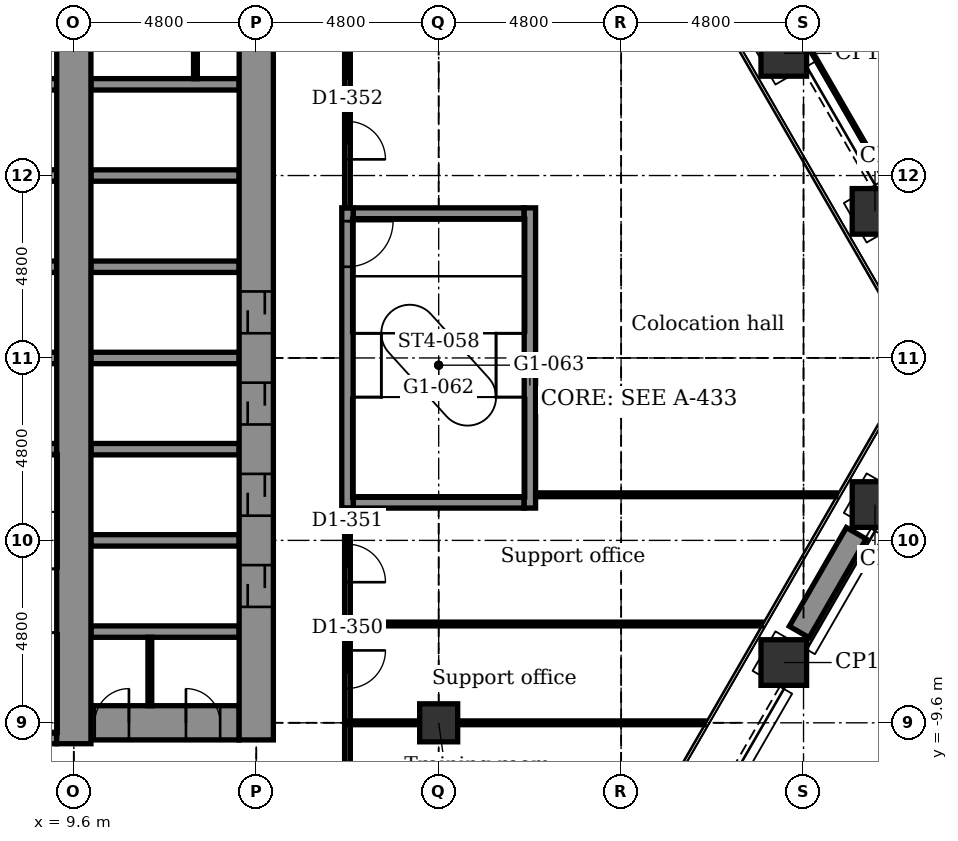
"""IFC4 building model, lengths in metres.
Left out: names, types, materials, properties, quantities, classifications, styles, units other than length and angle.
Written with IfcOpenShell. Run it as: python <this file> out.ifc"""

import sys

from ifc_helpers import new_model, si_unit, direction, frame, frame_2d, origin, origin_2d, place, context, subcontext, project, spatial, rectangle, extrude, element, fill, save


model = new_model("IFC4")
c1 = context("Model", 3, precision=1e-05, world=origin(), true_north=direction((0.0, 1.0)))
c2 = subcontext(c1, "Body", "Model", "MODEL_VIEW")
j1 = project(units=[si_unit("LENGTHUNIT", "METRE"), si_unit("PLANEANGLEUNIT", "RADIAN")], contexts=[c1])
p1 = place(None, origin())
s1 = spatial("IfcSite", under=j1, at=p1, CompositionType="ELEMENT")
p2 = place(p1, origin())
s2 = spatial("IfcBuilding", under=s1, at=p2, CompositionType="ELEMENT")
p3 = place(p2, frame((0.0, 0.0, 122.9)))
s3 = spatial("IfcBuildingStorey", under=s2, at=p3, CompositionType="ELEMENT", Elevation=122.9)
for number, where, z_axis, x_axis in (
    (1, (28.28, 8.014, -0.2), (0.0, 0.0, 1.0), (0.866, 0.5, 0.0)),
    (2, (30.68, 3.857, -0.2), (0.0, 0.0, 1.0), (0.866, 0.5, 0.0)),
    (3, (30.68, -3.857, -0.2), (0.0, 0.0, 1.0), (0.5, 0.866, 0.0)),
    (4, (28.28, -8.014, -0.2), (0.0, 0.0, 1.0), (0.5, 0.866, 0.0)),
):
    element("IfcColumn", number, at=place(p3, frame(where, z_axis=z_axis, x_axis=x_axis)), inside=s3, PredefinedType="COLUMN", context=c2, shape_type="SweptSolid", body=[
        extrude(rectangle(XDim=1.2, YDim=1.2, at=origin_2d()), origin(), (0.0, 0.0, 1.0), 4.4),
    ])
p4 = place(p3, frame((19.2, -9.6, -0.2), z_axis=(0.0, 0.0, 1.0), x_axis=(1.0, 0.0, 0.0)))
e5 = element("IfcColumn", 5, at=p4, inside=s3, PredefinedType="COLUMN", context=c2, shape_type="SweptSolid", body=[
    extrude(rectangle(XDim=1.0, YDim=1.0, at=origin_2d()), origin(), (0.0, 0.0, 1.0), 4.4),
])
p5 = place(p3, frame((4.95, -10.0, -0.2), z_axis=(0.0, 0.0, 1.0), x_axis=(1.0, 0.0, 0.0)))
e6 = element("IfcWall", 6, at=p5, inside=s3, PredefinedType="STANDARD", context=c2, shape_type="SweptSolid", body=[
    extrude(rectangle(XDim=4.2, YDim=0.3, at=frame_2d((2.1, 0.0))), origin(), (0.0, 0.0, 1.0), 4.4),
])
p6 = place(p3, frame((10.05, -9.6, -0.2), z_axis=(0.0, 0.0, 1.0), x_axis=(1.0, 0.0, 0.0)))
e7 = element("IfcWall", 7, at=p6, inside=s3, PredefinedType="SHEAR", context=c2, shape_type="SweptSolid", body=[
    extrude(rectangle(XDim=3.9, YDim=0.9, at=frame_2d((1.95, 0.0))), origin(), (0.0, 0.0, 1.0), 4.4),
])
p7 = place(p6, frame((0.1, 0.0, 0.2)))
e8 = element("IfcOpeningElement", 8, at=p7, cuts=e7, PredefinedType="OPENING", context=c2, shape_type="SweptSolid", body=[
    extrude(rectangle(XDim=0.9, YDim=2.1, at=frame_2d((0.45, 1.05))), frame((0.0, 0.46, 0.0), z_axis=(0.0, -1.0, 0.0), x_axis=(1.0, 0.0, 0.0)), (0.0, 0.0, 1.0), 0.92),
])
p8 = place(p6, frame((2.5, 0.0, 0.2)))
e9 = element("IfcOpeningElement", 9, at=p8, cuts=e7, PredefinedType="OPENING", context=c2, shape_type="SweptSolid", body=[
    extrude(rectangle(XDim=0.9, YDim=2.1, at=frame_2d((0.45, 1.05))), frame((0.0, 0.46, 0.0), z_axis=(0.0, -1.0, 0.0), x_axis=(1.0, 0.0, 0.0)), (0.0, 0.0, 1.0), 0.92),
])
for number, where, z_axis, x_axis in (
    (10, (10.05, -7.2, -0.2), (0.0, 0.0, 1.0), (1.0, 0.0, 0.0)),
    (11, (10.05, -4.8, -0.2), (0.0, 0.0, 1.0), (1.0, 0.0, 0.0)),
):
    element("IfcWall", number, at=place(p3, frame(where, z_axis=z_axis, x_axis=x_axis)), inside=s3, PredefinedType="STANDARD", context=c2, shape_type="SweptSolid", body=[
        extrude(rectangle(XDim=3.9, YDim=0.3, at=frame_2d((1.95, 0.0))), origin(), (0.0, 0.0, 1.0), 4.4),
    ])
p9 = place(p3, frame((16.95, -3.8, -0.2), z_axis=(0.0, 0.0, 1.0), x_axis=(1.0, 0.0, 0.0)))
e12 = element("IfcWall", 12, at=p9, inside=s3, PredefinedType="STANDARD", context=c2, shape_type="SweptSolid", body=[
    extrude(rectangle(XDim=4.5, YDim=0.3, at=frame_2d((2.25, 0.0))), origin(), (0.0, 0.0, 1.0), 4.4),
])
p10 = place(p3, frame((6.15, -2.4, -0.2), z_axis=(0.0, 0.0, 1.0), x_axis=(1.0, 0.0, 0.0)))
e13 = element("IfcWall", 13, at=p10, inside=s3, PredefinedType="STANDARD", context=c2, shape_type="SweptSolid", body=[
    extrude(rectangle(XDim=3.0, YDim=0.3, at=frame_2d((1.5, 0.0))), origin(), (0.0, 0.0, 1.0), 4.4),
])
p11 = place(p3, frame((10.05, -2.4, -0.2), z_axis=(0.0, 0.0, 1.0), x_axis=(1.0, 0.0, 0.0)))
e14 = element("IfcWall", 14, at=p11, inside=s3, PredefinedType="STANDARD", context=c2, shape_type="SweptSolid", body=[
    extrude(rectangle(XDim=3.9, YDim=0.3, at=frame_2d((1.95, 0.0))), origin(), (0.0, 0.0, 1.0), 4.4),
])
p12 = place(p3, frame((6.15, 0.0, -0.2), z_axis=(0.0, 0.0, 1.0), x_axis=(1.0, 0.0, 0.0)))
e15 = element("IfcWall", 15, at=p12, inside=s3, PredefinedType="STANDARD", context=c2, shape_type="SweptSolid", body=[
    extrude(rectangle(XDim=3.0, YDim=0.3, at=frame_2d((1.5, 0.0))), origin(), (0.0, 0.0, 1.0), 4.4),
])
p13 = place(p3, frame((10.05, 0.0, -0.2), z_axis=(0.0, 0.0, 1.0), x_axis=(1.0, 0.0, 0.0)))
e16 = element("IfcWall", 16, at=p13, inside=s3, PredefinedType="STANDARD", context=c2, shape_type="SweptSolid", body=[
    extrude(rectangle(XDim=3.9, YDim=0.3, at=frame_2d((1.95, 0.0))), origin(), (0.0, 0.0, 1.0), 4.4),
])
p14 = place(p3, frame((6.15, 2.4, -0.2), z_axis=(0.0, 0.0, 1.0), x_axis=(1.0, 0.0, 0.0)))
e17 = element("IfcWall", 17, at=p14, inside=s3, PredefinedType="STANDARD", context=c2, shape_type="SweptSolid", body=[
    extrude(rectangle(XDim=3.0, YDim=0.3, at=frame_2d((1.5, 0.0))), origin(), (0.0, 0.0, 1.0), 4.4),
])
p15 = place(p3, frame((10.05, 2.4, -0.2), z_axis=(0.0, 0.0, 1.0), x_axis=(1.0, 0.0, 0.0)))
e18 = element("IfcWall", 18, at=p15, inside=s3, PredefinedType="STANDARD", context=c2, shape_type="SweptSolid", body=[
    extrude(rectangle(XDim=3.9, YDim=0.3, at=frame_2d((1.95, 0.0))), origin(), (0.0, 0.0, 1.0), 4.4),
])
p16 = place(p3, frame((16.95, 3.8, -0.2), z_axis=(0.0, 0.0, 1.0), x_axis=(1.0, 0.0, 0.0)))
e19 = element("IfcWall", 19, at=p16, inside=s3, PredefinedType="STANDARD", context=c2, shape_type="SweptSolid", body=[
    extrude(rectangle(XDim=4.5, YDim=0.3, at=frame_2d((2.25, 0.0))), origin(), (0.0, 0.0, 1.0), 4.4),
])
p17 = place(p3, frame((6.15, 4.8, -0.2), z_axis=(0.0, 0.0, 1.0), x_axis=(1.0, 0.0, 0.0)))
e20 = element("IfcWall", 20, at=p17, inside=s3, PredefinedType="STANDARD", context=c2, shape_type="SweptSolid", body=[
    extrude(rectangle(XDim=3.0, YDim=0.3, at=frame_2d((1.5, 0.0))), origin(), (0.0, 0.0, 1.0), 4.4),
])
p18 = place(p3, frame((10.05, 4.8, -0.2), z_axis=(0.0, 0.0, 1.0), x_axis=(1.0, 0.0, 0.0)))
e21 = element("IfcWall", 21, at=p18, inside=s3, PredefinedType="STANDARD", context=c2, shape_type="SweptSolid", body=[
    extrude(rectangle(XDim=3.9, YDim=0.3, at=frame_2d((1.95, 0.0))), origin(), (0.0, 0.0, 1.0), 4.4),
])
p19 = place(p3, frame((6.0, 7.2, -0.2), z_axis=(0.0, 0.0, 1.0), x_axis=(1.0, 0.0, 0.0)))
e22 = element("IfcWall", 22, at=p19, inside=s3, PredefinedType="STANDARD", context=c2, shape_type="SweptSolid", body=[
    extrude(rectangle(XDim=3.15, YDim=0.3, at=frame_2d((1.575, 0.0))), origin(), (0.0, 0.0, 1.0), 4.4),
])
p20 = place(p3, frame((10.05, 7.2, -0.2), z_axis=(0.0, 0.0, 1.0), x_axis=(1.0, 0.0, 0.0)))
e23 = element("IfcWall", 23, at=p20, inside=s3, PredefinedType="STANDARD", context=c2, shape_type="SweptSolid", body=[
    extrude(rectangle(XDim=3.9, YDim=0.3, at=frame_2d((1.95, 0.0))), origin(), (0.0, 0.0, 1.0), 4.4),
])
p21 = place(p3, frame((9.6, -10.15, -0.2), z_axis=(0.0, 0.0, 1.0), x_axis=(0.0, 1.0, 0.0)))
e24 = element("IfcWall", 24, at=p21, inside=s3, PredefinedType="SHEAR", context=c2, shape_type="SweptSolid", body=[
    extrude(rectangle(XDim=20.2, YDim=0.9, at=frame_2d((10.1, 0.0))), origin(), (0.0, 0.0, 1.0), 4.4),
])
p22 = place(p3, frame((14.4, -10.05, -0.2), z_axis=(0.0, 0.0, 1.0), x_axis=(0.0, 1.0, 0.0)))
e25 = element("IfcWall", 25, at=p22, inside=s3, PredefinedType="SHEAR", context=c2, shape_type="SweptSolid", body=[
    extrude(rectangle(XDim=20.1, YDim=0.9, at=frame_2d((10.05, 0.0))), origin(), (0.0, 0.0, 1.0), 4.4),
])
p23 = place(p22, frame((3.5, 0.0, 0.2)))
e26 = element("IfcOpeningElement", 26, at=p23, cuts=e25, PredefinedType="OPENING", context=c2, shape_type="SweptSolid", body=[
    extrude(rectangle(XDim=1.1, YDim=2.1, at=frame_2d((0.55, 1.05))), frame((0.0, 0.46, 0.0), z_axis=(0.0, -1.0, 0.0), x_axis=(1.0, 0.0, 0.0)), (0.0, 0.0, 1.0), 0.92),
])
p24 = place(p22, frame((5.9, 0.0, 0.2)))
e27 = element("IfcOpeningElement", 27, at=p24, cuts=e25, PredefinedType="OPENING", context=c2, shape_type="SweptSolid", body=[
    extrude(rectangle(XDim=1.1, YDim=2.1, at=frame_2d((0.55, 1.05))), frame((0.0, 0.46, 0.0), z_axis=(0.0, -1.0, 0.0), x_axis=(1.0, 0.0, 0.0)), (0.0, 0.0, 1.0), 0.92),
])
p25 = place(p22, frame((8.3, 0.0, 0.2)))
e28 = element("IfcOpeningElement", 28, at=p25, cuts=e25, PredefinedType="OPENING", context=c2, shape_type="SweptSolid", body=[
    extrude(rectangle(XDim=1.1, YDim=2.1, at=frame_2d((0.55, 1.05))), frame((0.0, 0.46, 0.0), z_axis=(0.0, -1.0, 0.0), x_axis=(1.0, 0.0, 0.0)), (0.0, 0.0, 1.0), 0.92),
])
p26 = place(p22, frame((10.7, 0.0, 0.2)))
e29 = element("IfcOpeningElement", 29, at=p26, cuts=e25, PredefinedType="OPENING", context=c2, shape_type="SweptSolid", body=[
    extrude(rectangle(XDim=1.1, YDim=2.1, at=frame_2d((0.55, 1.05))), frame((0.0, 0.46, 0.0), z_axis=(0.0, -1.0, 0.0), x_axis=(1.0, 0.0, 0.0)), (0.0, 0.0, 1.0), 0.92),
])
p27 = place(p3, frame((16.8, -3.95, -0.2), z_axis=(0.0, 0.0, 1.0), x_axis=(0.0, 1.0, 0.0)))
e30 = element("IfcWall", 30, at=p27, inside=s3, PredefinedType="STANDARD", context=c2, shape_type="SweptSolid", body=[
    extrude(rectangle(XDim=7.9, YDim=0.3, at=frame_2d((3.95, 0.0))), origin(), (0.0, 0.0, 1.0), 4.4),
])
p28 = place(p27, frame((6.35, 0.0, 0.2)))
e31 = element("IfcOpeningElement", 31, at=p28, cuts=e30, PredefinedType="OPENING", context=c2, shape_type="SweptSolid", body=[
    extrude(rectangle(XDim=1.2, YDim=2.1, at=frame_2d((0.6, 1.05))), frame((0.0, 0.16, 0.0), z_axis=(0.0, -1.0, 0.0), x_axis=(1.0, 0.0, 0.0)), (0.0, 0.0, 1.0), 0.32),
])
p29 = place(p3, frame((21.6, -3.95, -0.2), z_axis=(0.0, 0.0, 1.0), x_axis=(0.0, 1.0, 0.0)))
e32 = element("IfcWall", 32, at=p29, inside=s3, PredefinedType="STANDARD", context=c2, shape_type="SweptSolid", body=[
    extrude(rectangle(XDim=7.9, YDim=0.3, at=frame_2d((3.95, 0.0))), origin(), (0.0, 0.0, 1.0), 4.4),
])
p30 = place(p3, frame((30.187, -4.611, 0.0), z_axis=(0.0, 0.0, 1.0), x_axis=(-0.499990139034, -0.866031096941, 0.0)))
e33 = element("IfcWall", 33, at=p30, inside=s3, PredefinedType="USERDEFINED", context=c2, shape_type="SweptSolid", body=[
    extrude(rectangle(XDim=3.0, YDim=0.6, at=frame_2d((1.5, 0.0))), origin(), (0.0, 0.0, 1.0), 0.7),
])
p31 = place(p3, frame((16.8, -13.3, 0.0), z_axis=(0.0, 0.0, 1.0), x_axis=(0.0, 1.0, 0.0)))
e34 = element("IfcWall", 34, at=p31, inside=s3, PredefinedType="PARTITIONING", context=c2, shape_type="SweptSolid", body=[
    extrude(rectangle(XDim=9.35, YDim=0.15, at=frame_2d((4.675, 0.0))), origin(), (0.0, 0.0, 1.0), 4.2),
])
p32 = place(p31, frame((1.64, 0.0, 0.0)))
e35 = element("IfcOpeningElement", 35, at=p32, cuts=e34, PredefinedType="OPENING", context=c2, shape_type="SweptSolid", body=[
    extrude(rectangle(XDim=1.0, YDim=2.1, at=frame_2d((0.5, 1.05))), frame((0.0, 0.085, 0.0), z_axis=(0.0, -1.0, 0.0), x_axis=(1.0, 0.0, 0.0)), (0.0, 0.0, 1.0), 0.17),
])
p33 = place(p31, frame((4.605, 0.0, 0.0)))
e36 = element("IfcOpeningElement", 36, at=p33, cuts=e34, PredefinedType="OPENING", context=c2, shape_type="SweptSolid", body=[
    extrude(rectangle(XDim=1.0, YDim=2.1, at=frame_2d((0.5, 1.05))), frame((0.0, 0.085, 0.0), z_axis=(0.0, -1.0, 0.0), x_axis=(1.0, 0.0, 0.0)), (0.0, 0.0, 1.0), 0.17),
])
p34 = place(p31, frame((7.4, 0.0, 0.0)))
e37 = element("IfcOpeningElement", 37, at=p34, cuts=e34, PredefinedType="OPENING", context=c2, shape_type="SweptSolid", body=[
    extrude(rectangle(XDim=1.0, YDim=2.1, at=frame_2d((0.5, 1.05))), frame((0.0, 0.085, 0.0), z_axis=(0.0, -1.0, 0.0), x_axis=(1.0, 0.0, 0.0)), (0.0, 0.0, 1.0), 0.17),
])
p35 = place(p3, frame((16.8, 3.95, 0.0), z_axis=(0.0, 0.0, 1.0), x_axis=(0.0, 1.0, 0.0)))
e38 = element("IfcWall", 38, at=p35, inside=s3, PredefinedType="PARTITIONING", context=c2, shape_type="SweptSolid", body=[
    extrude(rectangle(XDim=9.35, YDim=0.15, at=frame_2d((4.675, 0.0))), origin(), (0.0, 0.0, 1.0), 4.2),
])
p36 = place(p35, frame((1.275, 0.0, 0.0)))
e39 = element("IfcOpeningElement", 39, at=p36, cuts=e38, PredefinedType="OPENING", context=c2, shape_type="SweptSolid", body=[
    extrude(rectangle(XDim=1.0, YDim=2.1, at=frame_2d((0.5, 1.05))), frame((0.0, 0.085, 0.0), z_axis=(0.0, -1.0, 0.0), x_axis=(1.0, 0.0, 0.0)), (0.0, 0.0, 1.0), 0.17),
])
p37 = place(p35, frame((7.76, 0.0, 0.0)))
e40 = element("IfcOpeningElement", 40, at=p37, cuts=e38, PredefinedType="OPENING", context=c2, shape_type="SweptSolid", body=[
    extrude(rectangle(XDim=1.0, YDim=2.1, at=frame_2d((0.5, 1.05))), frame((0.0, 0.085, 0.0), z_axis=(0.0, -1.0, 0.0), x_axis=(1.0, 0.0, 0.0)), (0.0, 0.0, 1.0), 0.17),
])
p38 = place(p35, frame((3.4, 0.0, 0.9)))
e41 = element("IfcOpeningElement", 41, at=p38, cuts=e38, PredefinedType="OPENING", context=c2, shape_type="SweptSolid", body=[
    extrude(rectangle(XDim=2.4, YDim=1.5, at=frame_2d((1.2, 0.75))), frame((0.0, 0.085, 0.0), z_axis=(0.0, -1.0, 0.0), x_axis=(1.0, 0.0, 0.0)), (0.0, 0.0, 1.0), 0.17),
])
for number, where, z_axis, x_axis in (
    (42, (12.8, 7.35, 0.0), (0.0, 0.0, 1.0), (0.0, 1.0, 0.0)),
    (43, (11.6, -9.15, 0.0), (0.0, 0.0, 1.0), (0.0, 1.0, 0.0)),
):
    element("IfcWall", number, at=place(p3, frame(where, z_axis=z_axis, x_axis=x_axis)), inside=s3, PredefinedType="PARTITIONING", context=c2, shape_type="SweptSolid", body=[
        extrude(rectangle(XDim=1.8, YDim=0.1, at=frame_2d((0.9, 0.0))), origin(), (0.0, 0.0, 1.0), 4.2),
    ])
p39 = place(p3, frame((16.8, -9.6, 0.0), z_axis=(0.0, 0.0, 1.0), x_axis=(1.0, 0.0, 0.0)))
e44 = element("IfcWall", 44, at=p39, inside=s3, PredefinedType="PARTITIONING", context=c2, shape_type="SweptSolid", body=[
    extrude(rectangle(XDim=1.9, YDim=0.1, at=frame_2d((0.95, 0.0))), origin(), (0.0, 0.0, 1.0), 3.592),
])
p40 = place(p3, frame((19.7, -9.6, 0.0), z_axis=(0.0, 0.0, 1.0), x_axis=(1.0, 0.0, 0.0)))
e45 = element("IfcWall", 45, at=p40, inside=s3, PredefinedType="PARTITIONING", context=c2, shape_type="SweptSolid", body=[
    extrude(rectangle(XDim=6.487, YDim=0.1, at=frame_2d((3.243, 0.0))), origin(), (0.0, 0.0, 1.0), 3.592),
])
p41 = place(p3, frame((16.8, -7.0, 0.0), z_axis=(0.0, 0.0, 1.0), x_axis=(1.0, 0.0, 0.0)))
e46 = element("IfcWall", 46, at=p41, inside=s3, PredefinedType="PARTITIONING", context=c2, shape_type="SweptSolid", body=[
    extrude(rectangle(XDim=10.888, YDim=0.1, at=frame_2d((5.444, 0.0))), origin(), (0.0, 0.0, 1.0), 4.2),
])
p42 = place(p3, frame((21.75, -3.6, 0.0), z_axis=(0.0, 0.0, 1.0), x_axis=(1.0, 0.0, 0.0)))
e47 = element("IfcWall", 47, at=p42, inside=s3, PredefinedType="PARTITIONING", context=c2, shape_type="SweptSolid", body=[
    extrude(rectangle(XDim=7.901, YDim=0.1, at=frame_2d((3.95, 0.0))), origin(), (0.0, 0.0, 1.0), 4.2),
])
p43 = place(p33, frame((1.0, 0.0, 0.0), z_axis=(0.0, 0.0, 1.0), x_axis=(-1.0, 0.0, 0.0)))
e48 = element("IfcDoor", 48, at=p43, inside=s3, OperationType="SINGLE_SWING_RIGHT", PredefinedType="DOOR", context=c2, shape_type="SweptSolid", body=[
    extrude(rectangle(XDim=1.0, YDim=2.1, at=frame_2d((0.5, 1.05))), frame((0.0, 0.025, 0.0), z_axis=(0.0, -1.0, 0.0), x_axis=(1.0, 0.0, 0.0)), (0.0, 0.0, 1.0), 0.05),
])
fill(e36, e48)
p44 = place(p34, frame((1.0, 0.0, 0.0), z_axis=(0.0, 0.0, 1.0), x_axis=(-1.0, 0.0, 0.0)))
e49 = element("IfcDoor", 49, at=p44, inside=s3, OperationType="SINGLE_SWING_LEFT", PredefinedType="DOOR", context=c2, shape_type="SweptSolid", body=[
    extrude(rectangle(XDim=1.0, YDim=2.1, at=frame_2d((0.5, 1.05))), frame((0.0, 0.025, 0.0), z_axis=(0.0, -1.0, 0.0), x_axis=(1.0, 0.0, 0.0)), (0.0, 0.0, 1.0), 0.05),
])
fill(e37, e49)
p45 = place(p36, frame((1.0, 0.0, 0.0), z_axis=(0.0, 0.0, 1.0), x_axis=(-1.0, 0.0, 0.0)))
e50 = element("IfcDoor", 50, at=p45, inside=s3, OperationType="SINGLE_SWING_LEFT", PredefinedType="DOOR", context=c2, shape_type="SweptSolid", body=[
    extrude(rectangle(XDim=1.0, YDim=2.1, at=frame_2d((0.5, 1.05))), frame((0.0, 0.025, 0.0), z_axis=(0.0, -1.0, 0.0), x_axis=(1.0, 0.0, 0.0)), (0.0, 0.0, 1.0), 0.05),
])
fill(e39, e50)
p46 = place(p23, origin())
e51 = element("IfcDoor", 51, at=p46, inside=s3, OperationType="DOUBLE_DOOR_SLIDING", PredefinedType="DOOR", context=c2, shape_type="SweptSolid", body=[
    extrude(rectangle(XDim=1.1, YDim=2.1, at=frame_2d((0.55, 1.05))), frame((0.0, 0.025, 0.0), z_axis=(0.0, -1.0, 0.0), x_axis=(1.0, 0.0, 0.0)), (0.0, 0.0, 1.0), 0.05),
])
fill(e26, e51)
p47 = place(p24, origin())
e52 = element("IfcDoor", 52, at=p47, inside=s3, OperationType="DOUBLE_DOOR_SLIDING", PredefinedType="DOOR", context=c2, shape_type="SweptSolid", body=[
    extrude(rectangle(XDim=1.1, YDim=2.1, at=frame_2d((0.55, 1.05))), frame((0.0, 0.025, 0.0), z_axis=(0.0, -1.0, 0.0), x_axis=(1.0, 0.0, 0.0)), (0.0, 0.0, 1.0), 0.05),
])
fill(e27, e52)
p48 = place(p25, origin())
e53 = element("IfcDoor", 53, at=p48, inside=s3, OperationType="DOUBLE_DOOR_SLIDING", PredefinedType="DOOR", context=c2, shape_type="SweptSolid", body=[
    extrude(rectangle(XDim=1.1, YDim=2.1, at=frame_2d((0.55, 1.05))), frame((0.0, 0.025, 0.0), z_axis=(0.0, -1.0, 0.0), x_axis=(1.0, 0.0, 0.0)), (0.0, 0.0, 1.0), 0.05),
])
fill(e28, e53)
p49 = place(p26, origin())
e54 = element("IfcDoor", 54, at=p49, inside=s3, OperationType="DOUBLE_DOOR_SLIDING", PredefinedType="DOOR", context=c2, shape_type="SweptSolid", body=[
    extrude(rectangle(XDim=1.1, YDim=2.1, at=frame_2d((0.55, 1.05))), frame((0.0, 0.025, 0.0), z_axis=(0.0, -1.0, 0.0), x_axis=(1.0, 0.0, 0.0)), (0.0, 0.0, 1.0), 0.05),
])
fill(e29, e54)
p50 = place(p28, frame((1.2, 0.0, 0.0), z_axis=(0.0, 0.0, 1.0), x_axis=(-1.0, 0.0, 0.0)))
e55 = element("IfcDoor", 55, at=p50, inside=s3, OperationType="SINGLE_SWING_RIGHT", PredefinedType="DOOR", context=c2, shape_type="SweptSolid", body=[
    extrude(rectangle(XDim=1.2, YDim=2.1, at=frame_2d((0.6, 1.05))), frame((0.0, 0.025, 0.0), z_axis=(0.0, -1.0, 0.0), x_axis=(1.0, 0.0, 0.0)), (0.0, 0.0, 1.0), 0.05),
])
fill(e31, e55)
p51 = place(p7, origin())
e56 = element("IfcDoor", 56, at=p51, inside=s3, OperationType="SINGLE_SWING_RIGHT", PredefinedType="DOOR", context=c2, shape_type="SweptSolid", body=[
    extrude(rectangle(XDim=0.9, YDim=2.1, at=frame_2d((0.45, 1.05))), frame((0.0, 0.025, 0.0), z_axis=(0.0, -1.0, 0.0), x_axis=(1.0, 0.0, 0.0)), (0.0, 0.0, 1.0), 0.05),
])
fill(e8, e56)
p52 = place(p8, origin())
e57 = element("IfcDoor", 57, at=p52, inside=s3, OperationType="SINGLE_SWING_LEFT", PredefinedType="DOOR", context=c2, shape_type="SweptSolid", body=[
    extrude(rectangle(XDim=0.9, YDim=2.1, at=frame_2d((0.45, 1.05))), frame((0.0, 0.025, 0.0), z_axis=(0.0, -1.0, 0.0), x_axis=(1.0, 0.0, 0.0)), (0.0, 0.0, 1.0), 0.05),
])
fill(e9, e57)
p53 = place(p38, origin())
e58 = element("IfcWindow", 58, at=p53, inside=s3, PartitioningType="SINGLE_PANEL", PredefinedType="WINDOW", context=c2, shape_type="SweptSolid", body=[
    extrude(rectangle(XDim=2.4, YDim=1.5, at=frame_2d((1.2, 0.75))), frame((0.0, 0.03, 0.0), z_axis=(0.0, -1.0, 0.0), x_axis=(1.0, 0.0, 0.0)), (0.0, 0.0, 1.0), 0.06),
])
fill(e41, e58)
save(model, sys.argv[1])
